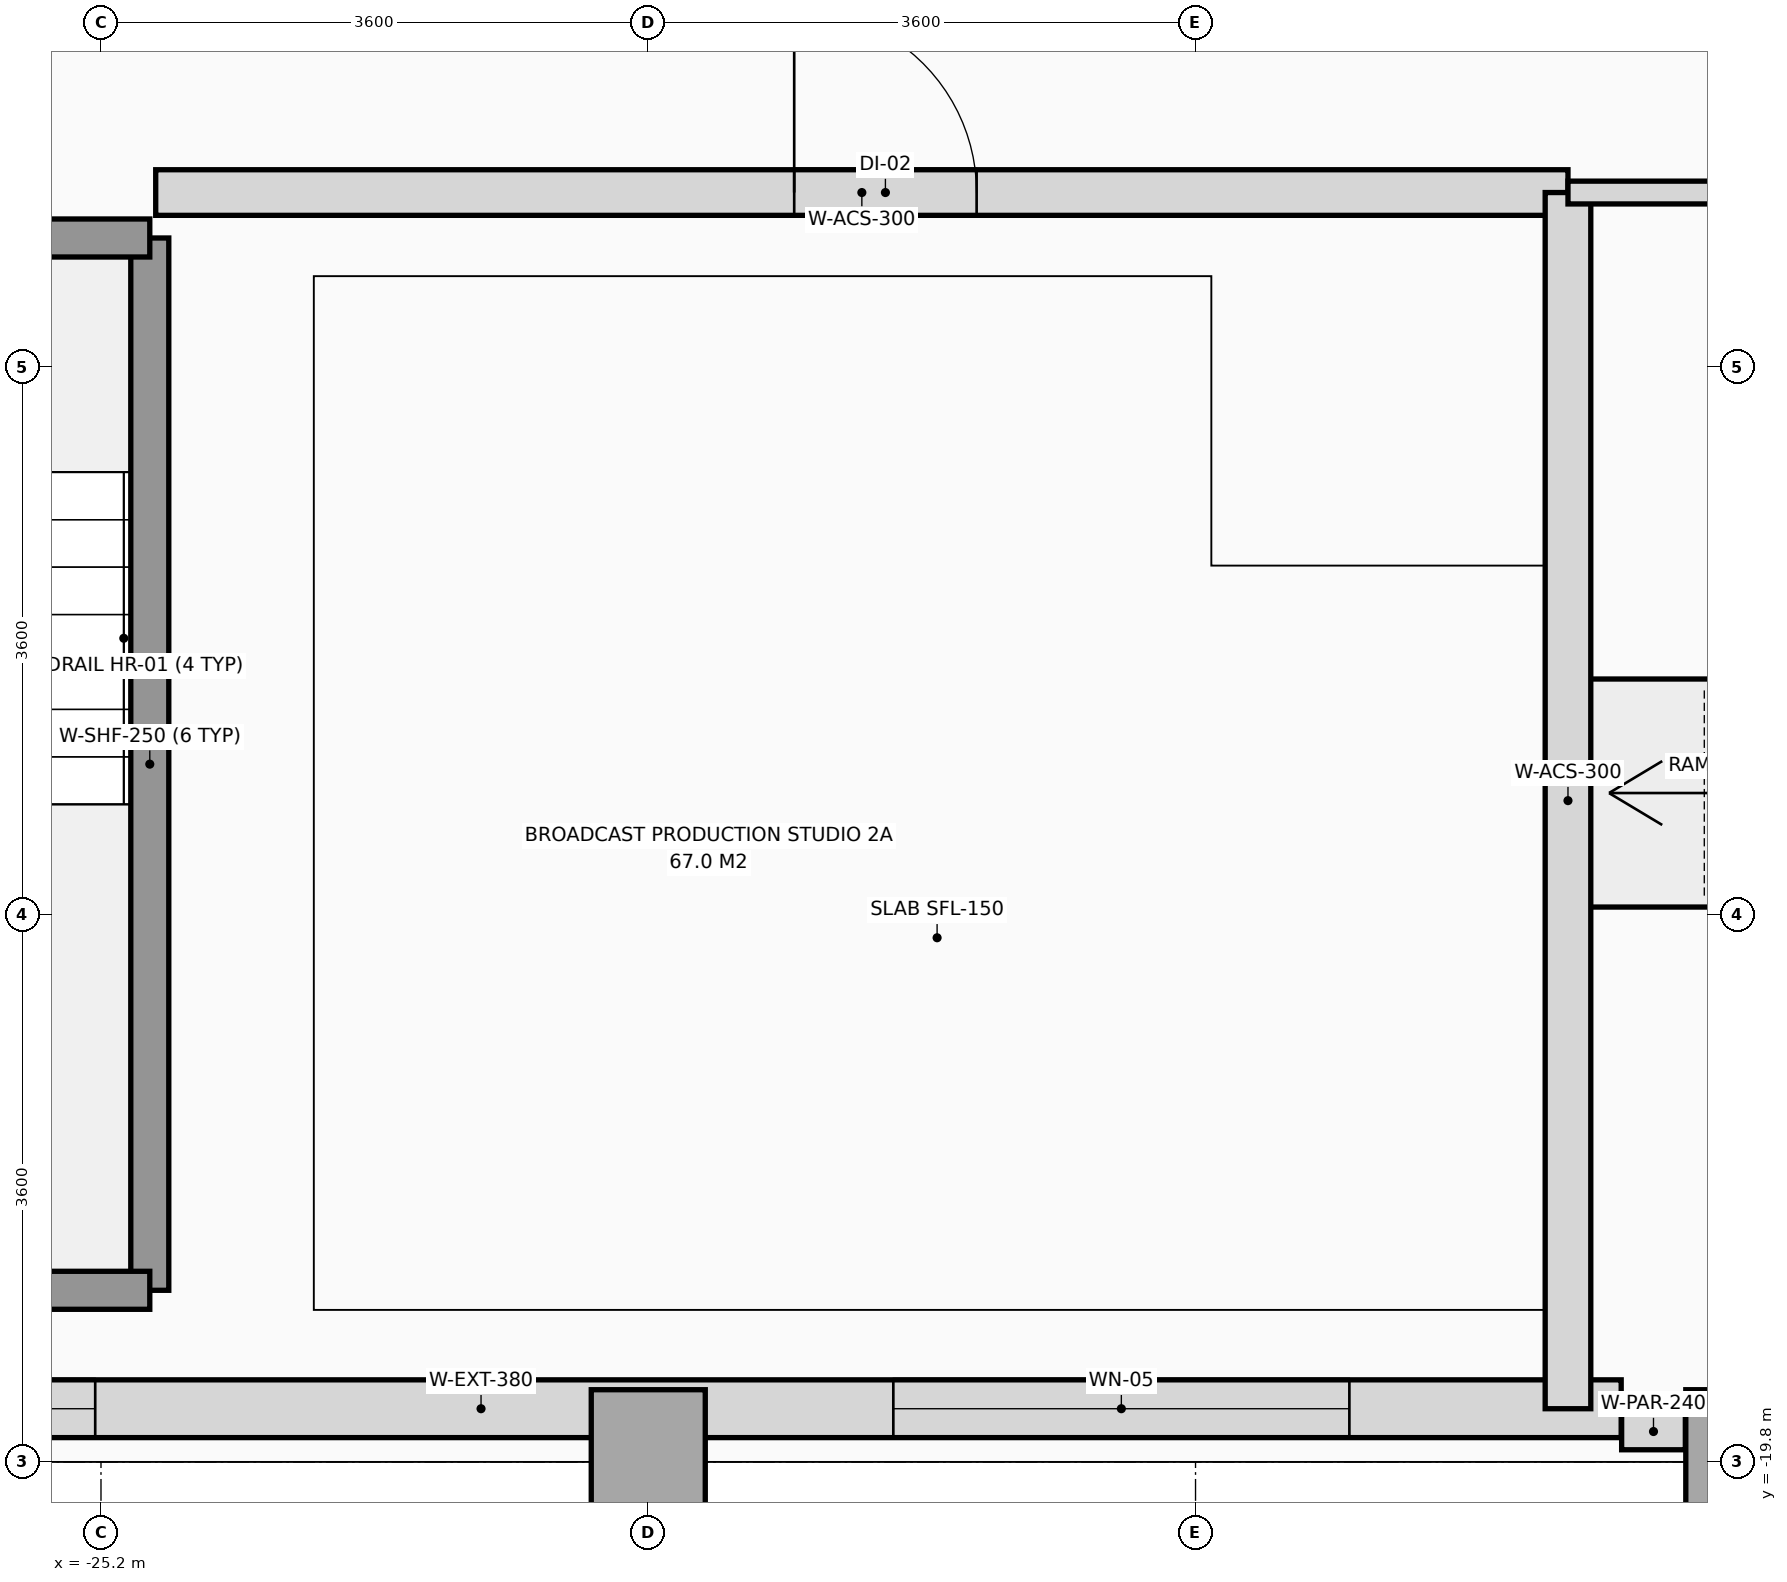
"""IFC4 building model, lengths in metres.
Left out: names, types, materials, properties, quantities, classifications, styles, units other than length and angle.
Written with IfcOpenShell. Run it as: python <this file> out.ifc"""

import sys

from ifc_helpers import new_model, si_unit, direction, frame, frame_2d, origin, origin_2d, place, context, subcontext, project, spatial, rectangle, extrude, source, transform, mapped, element, fill, save


model = new_model("IFC4")
c1 = context("Model", 3, precision=1e-05, world=origin(), true_north=direction((0.0, 1.0)))
c2 = subcontext(c1, "Body", "Model", "MODEL_VIEW")
j1 = project(units=[si_unit("LENGTHUNIT", "METRE"), si_unit("PLANEANGLEUNIT", "RADIAN")], contexts=[c1])
p1 = place(None, origin())
s1 = spatial("IfcSite", under=j1, at=p1, CompositionType="ELEMENT")
p2 = place(p1, origin())
s2 = spatial("IfcBuilding", under=s1, at=p2, CompositionType="ELEMENT")
p3 = place(p2, frame((0.0, 0.0, 10.2)))
s3 = spatial("IfcBuildingStorey", under=s2, at=p3, CompositionType="ELEMENT", Elevation=10.2)
m1 = source(origin(), c2, "Body", "SweptSolid", [
    extrude(rectangle(XDim=0.75, YDim=0.95, at=origin_2d()), origin(), (0.0, 0.0, 1.0), 5.15),
])
for number, where, z_axis, x_axis in (
    (1, (-21.6, -19.8, 0.0), (0.0, 0.0, 1.0), (1.0, 0.0, 0.0)),
    (2, (-14.4, -19.8, 0.0), (0.0, 0.0, 1.0), (1.0, 0.0, 0.0)),
):
    element("IfcColumn", number, at=place(p3, frame(where, z_axis=z_axis, x_axis=x_axis)), inside=s3, PredefinedType="COLUMN", context=c2, shape_type="MappedRepresentation", body=[
        mapped(m1, transform((0.0, 0.0, 0.0), x_axis=(1.0, 0.0, 0.0), y_axis=(0.0, 1.0, 0.0), z_axis=(0.0, 0.0, 1.0), scale=1.0)),
    ])
p4 = place(p3, frame((-32.05, -19.45, 0.0), z_axis=(0.0, 0.0, 1.0), x_axis=(1.0, 0.0, 0.0)))
e3 = element("IfcWall", 3, at=p4, inside=s3, PredefinedType="SOLIDWALL", context=c2, shape_type="SweptSolid", body=[
    extrude(rectangle(XDim=16.85, YDim=0.38, at=frame_2d((8.425, 0.0))), origin(), (0.0, 0.0, 1.0), 4.4),
])
p5 = place(p4, frame((3.812, 0.0, 0.95)))
e4 = element("IfcOpeningElement", 4, at=p5, cuts=e3, PredefinedType="OPENING", context=c2, shape_type="SweptSolid", body=[
    extrude(rectangle(XDim=3.0, YDim=2.4, at=frame_2d((1.5, 1.2))), frame((0.0, 0.2, 0.0), z_axis=(0.0, -1.0, 0.0), x_axis=(1.0, 0.0, 0.0)), (0.0, 0.0, 1.0), 0.4),
])
p6 = place(p4, frame((12.062, 0.0, 0.95)))
e5 = element("IfcOpeningElement", 5, at=p6, cuts=e3, PredefinedType="OPENING", context=c2, shape_type="SweptSolid", body=[
    extrude(rectangle(XDim=3.0, YDim=2.4, at=frame_2d((1.5, 1.2))), frame((0.0, 0.2, 0.0), z_axis=(0.0, -1.0, 0.0), x_axis=(1.0, 0.0, 0.0)), (0.0, 0.0, 1.0), 0.4),
])
p7 = place(p3, frame((-14.778, -19.6, 0.0), z_axis=(0.0, 0.0, 1.0), x_axis=(-1.0, 0.0, 0.0)))
e6 = element("IfcWall", 6, at=p7, inside=s3, PredefinedType="PARAPET", context=c2, shape_type="SweptSolid", body=[
    extrude(rectangle(XDim=0.419, YDim=0.24, at=frame_2d((0.209, 0.0))), origin(), (0.0, 0.0, 1.0), 1.15),
])
p8 = place(p3, frame((-24.879, -18.671, 0.0), z_axis=(0.0, 0.0, 1.0), x_axis=(0.0, 1.0, 0.0)))
e7 = element("IfcWall", 7, at=p8, inside=s3, PredefinedType="SOLIDWALL", context=c2, shape_type="SweptSolid", body=[
    extrude(rectangle(XDim=6.922, YDim=0.25, at=frame_2d((3.461, 0.0))), origin(), (0.0, 0.0, 1.0), 5.15),
])
p9 = place(p3, frame((-28.001, -18.671, 0.0), z_axis=(0.0, 0.0, 1.0), x_axis=(1.0, 0.0, 0.0)))
e8 = element("IfcWall", 8, at=p9, inside=s3, PredefinedType="SOLIDWALL", context=c2, shape_type="SweptSolid", body=[
    extrude(rectangle(XDim=3.122, YDim=0.25, at=frame_2d((1.561, 0.0))), origin(), (0.0, 0.0, 1.0), 5.15),
])
p10 = place(p3, frame((-28.001, -11.749, 0.0), z_axis=(0.0, 0.0, 1.0), x_axis=(1.0, 0.0, 0.0)))
e9 = element("IfcWall", 9, at=p10, inside=s3, PredefinedType="SOLIDWALL", context=c2, shape_type="SweptSolid", body=[
    extrude(rectangle(XDim=3.122, YDim=0.25, at=frame_2d((1.561, 0.0))), origin(), (0.0, 0.0, 1.0), 5.15),
])
p11 = place(p10, frame((0.8, 0.0, 0.0)))
e10 = element("IfcOpeningElement", 10, at=p11, cuts=e9, PredefinedType="OPENING", context=c2, shape_type="SweptSolid", body=[
    extrude(rectangle(XDim=1.2, YDim=2.2, at=frame_2d((0.6, 1.1))), frame((0.0, 0.135, 0.0), z_axis=(0.0, -1.0, 0.0), x_axis=(1.0, 0.0, 0.0)), (0.0, 0.0, 1.0), 0.27),
])
p12 = place(p3, frame((-24.84, -11.45, 0.0), z_axis=(0.0, 0.0, 1.0), x_axis=(1.0, 0.0, 0.0)))
e11 = element("IfcWall", 11, at=p12, inside=s3, PredefinedType="SOLIDWALL", context=c2, shape_type="SweptSolid", body=[
    extrude(rectangle(XDim=9.29, YDim=0.3, at=frame_2d((4.645, 0.0))), origin(), (0.0, 0.0, 1.0), 5.15),
])
p13 = place(p12, frame((4.2, 0.0, 0.0)))
e12 = element("IfcOpeningElement", 12, at=p13, cuts=e11, PredefinedType="OPENING", context=c2, shape_type="SweptSolid", body=[
    extrude(rectangle(XDim=1.2, YDim=2.2, at=frame_2d((0.6, 1.1))), frame((0.0, 0.16, 0.0), z_axis=(0.0, -1.0, 0.0), x_axis=(1.0, 0.0, 0.0)), (0.0, 0.0, 1.0), 0.32),
])
p14 = place(p3, frame((-15.55, -19.45, 0.0), z_axis=(0.0, 0.0, 1.0), x_axis=(0.0, 1.0, 0.0)))
e13 = element("IfcWall", 13, at=p14, inside=s3, PredefinedType="SOLIDWALL", context=c2, shape_type="SweptSolid", body=[
    extrude(rectangle(XDim=8.0, YDim=0.3, at=frame_2d((4.0, 0.0))), origin(), (0.0, 0.0, 1.0), 4.4),
])
p15 = place(p3, frame((-15.55, -11.45, 0.0), z_axis=(0.0, 0.0, 1.0), x_axis=(1.0, 0.0, 0.0)))
e14 = element("IfcWall", 14, at=p15, inside=s3, PredefinedType="PARTITIONING", context=c2, shape_type="SweptSolid", body=[
    extrude(rectangle(XDim=31.1, YDim=0.15, at=frame_2d((15.55, 0.0))), origin(), (0.0, 0.0, 1.0), 4.55),
])
p16 = place(p15, frame((12.2, 0.0, 0.0)))
e15 = element("IfcOpeningElement", 15, at=p16, cuts=e14, PredefinedType="OPENING", context=c2, shape_type="SweptSolid", body=[
    extrude(rectangle(XDim=1.2, YDim=2.2, at=frame_2d((0.6, 1.1))), frame((0.0, 0.085, 0.0), z_axis=(0.0, -1.0, 0.0), x_axis=(1.0, 0.0, 0.0)), (0.0, 0.0, 1.0), 0.17),
])
m2 = source(origin(), c2, "Body", "SweptSolid", [
    extrude(rectangle(XDim=3.0, YDim=2.4, at=frame_2d((1.5, 1.2))), frame((0.0, 0.03, 0.0), z_axis=(0.0, -1.0, 0.0), x_axis=(1.0, 0.0, 0.0)), (0.0, 0.0, 1.0), 0.06),
])
p17 = place(p5, origin())
e16 = element("IfcWindow", 16, at=p17, inside=s3, PartitioningType="SINGLE_PANEL", PredefinedType="WINDOW", context=c2, shape_type="MappedRepresentation", body=[
    mapped(m2, transform((0.0, 0.0, 0.0), x_axis=(1.0, 0.0, 0.0), y_axis=(0.0, 1.0, 0.0), z_axis=(0.0, 0.0, 1.0), scale=1.0)),
])
fill(e4, e16)
p18 = place(p6, origin())
e17 = element("IfcWindow", 17, at=p18, inside=s3, PartitioningType="SINGLE_PANEL", PredefinedType="WINDOW", context=c2, shape_type="MappedRepresentation", body=[
    mapped(m2, transform((0.0, 0.0, 0.0), x_axis=(1.0, 0.0, 0.0), y_axis=(0.0, 1.0, 0.0), z_axis=(0.0, 0.0, 1.0), scale=1.0)),
])
fill(e5, e17)
m3 = source(origin(), c2, "Body", "SweptSolid", [
    extrude(rectangle(XDim=1.2, YDim=2.2, at=frame_2d((0.6, 1.1))), frame((0.0, 0.025, 0.0), z_axis=(0.0, -1.0, 0.0), x_axis=(1.0, 0.0, 0.0)), (0.0, 0.0, 1.0), 0.05),
])
p19 = place(p13, origin())
e18 = element("IfcDoor", 18, at=p19, inside=s3, OperationType="SINGLE_SWING_LEFT", PredefinedType="DOOR", context=c2, shape_type="MappedRepresentation", body=[
    mapped(m3, transform((0.0, 0.0, 0.0), x_axis=(1.0, 0.0, 0.0), y_axis=(0.0, 1.0, 0.0), z_axis=(0.0, 0.0, 1.0), scale=1.0)),
])
fill(e12, e18)
save(model, sys.argv[1])
